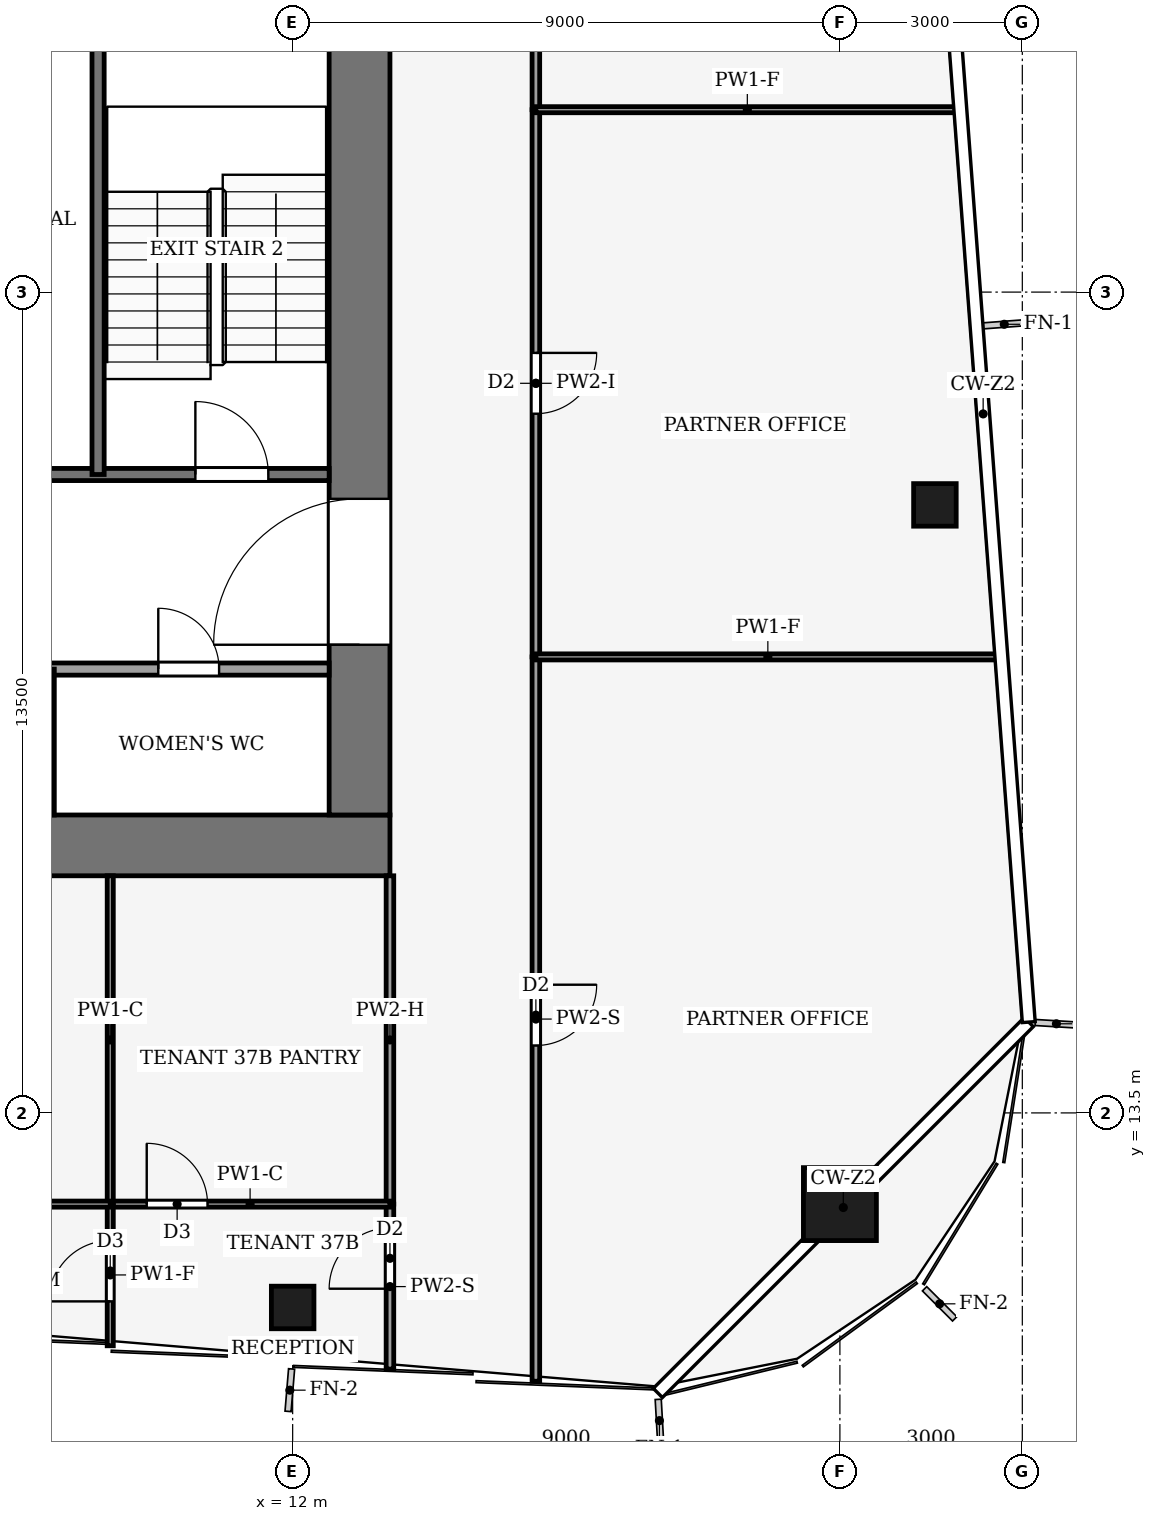
"""IFC4 building model, lengths in metres.
Left out: names, types, materials, properties, quantities, classifications, styles, units other than length and angle.
Written with IfcOpenShell. Run it as: python <this file> out.ifc"""

import sys

from ifc_helpers import new_model, si_unit, direction, frame, frame_2d, origin, origin_2d, place, context, subcontext, project, spatial, rectangle, hollow_rectangle, extrude, element, fill, save


model = new_model("IFC4")
c1 = context("Model", 3, precision=1e-05, world=origin(), true_north=direction((0.0, 1.0)))
c2 = subcontext(c1, "Body", "Model", "MODEL_VIEW")
j1 = project(units=[si_unit("LENGTHUNIT", "METRE"), si_unit("PLANEANGLEUNIT", "RADIAN")], contexts=[c1])
p1 = place(None, origin())
s1 = spatial("IfcSite", under=j1, at=p1, CompositionType="ELEMENT")
p2 = place(p1, origin())
s2 = spatial("IfcBuilding", under=s1, at=p2, CompositionType="ELEMENT")
p3 = place(p2, frame((0.0, 0.0, 162.0)))
s3 = spatial("IfcBuildingStorey", under=s2, at=p3, CompositionType="ELEMENT", Elevation=162.0)
p4 = place(p3, frame((-13.6, 17.9, -0.13), z_axis=(0.0, 0.0, 1.0), x_axis=(1.0, 0.0, 0.0)))
e1 = element("IfcWall", 1, at=p4, inside=s3, PredefinedType="SHEAR", context=c2, shape_type="SweptSolid", body=[
    extrude(rectangle(XDim=27.2, YDim=1.0, at=frame_2d((13.6, 0.0))), origin(), (0.0, 0.0, 1.0), 4.0),
])
p5 = place(p3, frame((13.1, 18.4, -0.13), z_axis=(0.0, 0.0, 1.0), x_axis=(0.0, 1.0, 0.0)))
e2 = element("IfcWall", 2, at=p5, inside=s3, PredefinedType="SHEAR", context=c2, shape_type="SweptSolid", body=[
    extrude(rectangle(XDim=19.2, YDim=1.0, at=frame_2d((9.6, 0.0))), origin(), (0.0, 0.0, 1.0), 4.0),
])
p6 = place(p5, frame((2.8, 0.0, 0.13)))
e3 = element("IfcOpeningElement", 3, at=p6, cuts=e2, PredefinedType="OPENING", context=c2, shape_type="SweptSolid", body=[
    extrude(rectangle(XDim=2.4, YDim=2.4, at=frame_2d((1.2, 1.2))), frame((0.0, 0.51, 0.0), z_axis=(0.0, -1.0, 0.0), x_axis=(1.0, 0.0, 0.0)), (0.0, 0.0, 1.0), 1.02),
])
p7 = place(p5, frame((13.3, 0.0, 0.13)))
e4 = element("IfcOpeningElement", 4, at=p7, cuts=e2, PredefinedType="OPENING", context=c2, shape_type="SweptSolid", body=[
    extrude(rectangle(XDim=2.4, YDim=2.4, at=frame_2d((1.2, 1.2))), frame((0.0, 0.51, 0.0), z_axis=(0.0, -1.0, 0.0), x_axis=(1.0, 0.0, 0.0)), (0.0, 0.0, 1.0), 1.02),
])
p8 = place(p3, frame((21.0, 12.0, 0.0), z_axis=(0.0, 0.0, 1.0), x_axis=(1.0, 0.0, 0.0)))
e5 = element("IfcColumn", 5, at=p8, inside=s3, PredefinedType="COLUMN", context=c2, shape_type="SweptSolid", body=[
    extrude(hollow_rectangle(XDim=1.2, YDim=1.2, WallThickness=0.07, at=origin_2d()), origin(), (0.0, 0.0, 1.0), 4.0),
])
for number, where, z_axis, x_axis in (
    (6, (12.0, 10.3, 0.0), (0.0, 0.0, 1.0), (1.0, 0.0, 0.0)),
    (7, (22.562, 23.5, 0.0), (0.0, 0.0, 1.0), (1.0, 0.0, 0.0)),
):
    element("IfcColumn", number, at=place(p3, frame(where, z_axis=z_axis, x_axis=x_axis)), inside=s3, PredefinedType="COLUMN", context=c2, shape_type="SweptSolid", body=[
        extrude(hollow_rectangle(XDim=0.7, YDim=0.7, WallThickness=0.03, at=origin_2d()), origin(), (0.0, 0.0, 1.0), 4.0),
    ])
p9 = place(p3, frame((6.0, 20.8, 0.0), z_axis=(0.0, 0.0, 1.0), x_axis=(1.0, 0.0, 0.0)))
e8 = element("IfcWall", 8, at=p9, inside=s3, PredefinedType="PARTITIONING", context=c2, shape_type="SweptSolid", body=[
    extrude(rectangle(XDim=6.6, YDim=0.2, at=frame_2d((3.3, 0.0))), origin(), (0.0, 0.0, 1.0), 3.87),
])
p10 = place(p9, frame((0.49, 0.0, 0.0)))
e9 = element("IfcOpeningElement", 9, at=p10, cuts=e8, PredefinedType="OPENING", context=c2, shape_type="SweptSolid", body=[
    extrude(rectangle(XDim=1.0, YDim=2.1, at=frame_2d((0.5, 1.05))), frame((0.0, 0.11, 0.0), z_axis=(0.0, -1.0, 0.0), x_axis=(1.0, 0.0, 0.0)), (0.0, 0.0, 1.0), 0.22),
])
p11 = place(p9, frame((3.79, 0.0, 0.0)))
e10 = element("IfcOpeningElement", 10, at=p11, cuts=e8, PredefinedType="OPENING", context=c2, shape_type="SweptSolid", body=[
    extrude(rectangle(XDim=1.0, YDim=2.1, at=frame_2d((0.5, 1.05))), frame((0.0, 0.11, 0.0), z_axis=(0.0, -1.0, 0.0), x_axis=(1.0, 0.0, 0.0)), (0.0, 0.0, 1.0), 0.22),
])
p12 = place(p3, frame((6.0, 24.0, 0.0), z_axis=(0.0, 0.0, 1.0), x_axis=(1.0, 0.0, 0.0)))
e11 = element("IfcWall", 11, at=p12, inside=s3, PredefinedType="PARTITIONING", context=c2, shape_type="SweptSolid", body=[
    extrude(rectangle(XDim=6.6, YDim=0.2, at=frame_2d((3.3, 0.0))), origin(), (0.0, 0.0, 1.0), 3.87),
])
p13 = place(p12, frame((0.9, 0.0, 0.0)))
e12 = element("IfcOpeningElement", 12, at=p13, cuts=e11, PredefinedType="OPENING", context=c2, shape_type="SweptSolid", body=[
    extrude(rectangle(XDim=1.0, YDim=2.1, at=frame_2d((0.5, 1.05))), frame((0.0, 0.11, 0.0), z_axis=(0.0, -1.0, 0.0), x_axis=(1.0, 0.0, 0.0)), (0.0, 0.0, 1.0), 0.22),
])
p14 = place(p12, frame((4.4, 0.0, 0.0)))
e13 = element("IfcOpeningElement", 13, at=p14, cuts=e11, PredefinedType="OPENING", context=c2, shape_type="SweptSolid", body=[
    extrude(rectangle(XDim=1.2, YDim=2.2, at=frame_2d((0.6, 1.1))), frame((0.0, 0.11, 0.0), z_axis=(0.0, -1.0, 0.0), x_axis=(1.0, 0.0, 0.0)), (0.0, 0.0, 1.0), 0.22),
])
p15 = place(p3, frame((7.98, 18.4, 0.0), z_axis=(0.0, 0.0, 1.0), x_axis=(0.0, 1.0, 0.0)))
e14 = element("IfcWall", 14, at=p15, inside=s3, PredefinedType="PARTITIONING", context=c2, shape_type="SweptSolid", body=[
    extrude(rectangle(XDim=2.4, YDim=0.2, at=frame_2d((1.2, 0.0))), origin(), (0.0, 0.0, 1.0), 3.87),
])
p16 = place(p3, frame((8.8, 24.0, 0.0), z_axis=(0.0, 0.0, 1.0), x_axis=(0.0, 1.0, 0.0)))
e15 = element("IfcWall", 15, at=p16, inside=s3, PredefinedType="PARTITIONING", context=c2, shape_type="SweptSolid", body=[
    extrude(rectangle(XDim=7.4, YDim=0.2, at=frame_2d((3.7, 0.0))), origin(), (0.0, 0.0, 1.0), 3.87),
])
p17 = place(p3, frame((16.0, 21.0, 0.0), z_axis=(0.0, 0.0, 1.0), x_axis=(0.0, -1.0, 0.0)))
e16 = element("IfcWall", 16, at=p17, inside=s3, PredefinedType="PARTITIONING", context=c2, shape_type="SweptSolid", body=[
    extrude(rectangle(XDim=11.913, YDim=0.125, at=frame_2d((5.957, 0.0))), origin(), (0.0, 0.0, 1.0), 3.04),
])
p18 = place(p17, frame((5.392, 0.0, 0.0)))
e17 = element("IfcOpeningElement", 17, at=p18, cuts=e16, PredefinedType="OPENING", context=c2, shape_type="SweptSolid", body=[
    extrude(rectangle(XDim=1.0, YDim=2.1, at=frame_2d((0.5, 1.05))), frame((0.0, 0.073, 0.0), z_axis=(0.0, -1.0, 0.0), x_axis=(1.0, 0.0, 0.0)), (0.0, 0.0, 1.0), 0.145),
])
p19 = place(p3, frame((16.0, 30.0, 0.0), z_axis=(0.0, 0.0, 1.0), x_axis=(0.0, -1.0, 0.0)))
e18 = element("IfcWall", 18, at=p19, inside=s3, PredefinedType="PARTITIONING", context=c2, shape_type="SweptSolid", body=[
    extrude(rectangle(XDim=9.0, YDim=0.125, at=frame_2d((4.5, 0.0))), origin(), (0.0, 0.0, 1.0), 3.48),
])
p20 = place(p19, frame((4.0, 0.0, 0.0)))
e19 = element("IfcOpeningElement", 19, at=p20, cuts=e18, PredefinedType="OPENING", context=c2, shape_type="SweptSolid", body=[
    extrude(rectangle(XDim=1.0, YDim=2.1, at=frame_2d((0.5, 1.05))), frame((0.0, 0.073, 0.0), z_axis=(0.0, -1.0, 0.0), x_axis=(1.0, 0.0, 0.0)), (0.0, 0.0, 1.0), 0.145),
])
p21 = place(p3, frame((16.0, 41.004, 0.0), z_axis=(0.0, 0.0, 1.0), x_axis=(0.0, -1.0, 0.0)))
e20 = element("IfcWall", 20, at=p21, inside=s3, PredefinedType="PARTITIONING", context=c2, shape_type="SweptSolid", body=[
    extrude(rectangle(XDim=11.004, YDim=0.125, at=frame_2d((5.502, 0.0))), origin(), (0.0, 0.0, 1.0), 3.14),
])
p22 = place(p21, frame((5.002, 0.0, 0.0)))
e21 = element("IfcOpeningElement", 21, at=p22, cuts=e20, PredefinedType="OPENING", context=c2, shape_type="SweptSolid", body=[
    extrude(rectangle(XDim=1.0, YDim=2.1, at=frame_2d((0.5, 1.05))), frame((0.0, 0.073, 0.0), z_axis=(0.0, -1.0, 0.0), x_axis=(1.0, 0.0, 0.0)), (0.0, 0.0, 1.0), 0.145),
])
p23 = place(p3, frame((13.6, 9.287, 0.0), z_axis=(0.0, 0.0, 1.0), x_axis=(0.0, 1.0, 0.0)))
e22 = element("IfcWall", 22, at=p23, inside=s3, PredefinedType="PARTITIONING", context=c2, shape_type="SweptSolid", body=[
    extrude(rectangle(XDim=2.713, YDim=0.125, at=frame_2d((1.357, 0.0))), origin(), (0.0, 0.0, 1.0), 3.04),
])
p24 = place(p23, frame((1.322, 0.0, 0.0)))
e23 = element("IfcOpeningElement", 23, at=p24, cuts=e22, PredefinedType="OPENING", context=c2, shape_type="SweptSolid", body=[
    extrude(rectangle(XDim=1.0, YDim=2.1, at=frame_2d((0.5, 1.05))), frame((0.0, 0.073, 0.0), z_axis=(0.0, -1.0, 0.0), x_axis=(1.0, 0.0, 0.0)), (0.0, 0.0, 1.0), 0.145),
])
p25 = place(p3, frame((13.6, 12.0, 0.0), z_axis=(0.0, 0.0, 1.0), x_axis=(0.0, 1.0, 0.0)))
e24 = element("IfcWall", 24, at=p25, inside=s3, PredefinedType="PARTITIONING", context=c2, shape_type="SweptSolid", body=[
    extrude(rectangle(XDim=5.4, YDim=0.125, at=frame_2d((2.7, 0.0))), origin(), (0.0, 0.0, 1.0), 3.14),
])
p26 = place(p3, frame((23.63, 21.0, 0.0), z_axis=(0.0, 0.0, 1.0), x_axis=(-1.0, 0.0, 0.0)))
e25 = element("IfcWall", 25, at=p26, inside=s3, PredefinedType="PARTITIONING", context=c2, shape_type="SweptSolid", body=[
    extrude(rectangle(XDim=7.63, YDim=0.1, at=frame_2d((3.815, 0.0))), origin(), (0.0, 0.0, 1.0), 3.04),
])
p27 = place(p3, frame((22.955, 30.0, 0.0), z_axis=(0.0, 0.0, 1.0), x_axis=(-1.0, 0.0, 0.0)))
e26 = element("IfcWall", 26, at=p27, inside=s3, PredefinedType="PARTITIONING", context=c2, shape_type="SweptSolid", body=[
    extrude(rectangle(XDim=6.955, YDim=0.1, at=frame_2d((3.478, 0.0))), origin(), (0.0, 0.0, 1.0), 3.04),
])
p28 = place(p3, frame((9.0, 12.0, 0.0), z_axis=(0.0, 0.0, 1.0), x_axis=(1.0, 0.0, 0.0)))
e27 = element("IfcWall", 27, at=p28, inside=s3, PredefinedType="PARTITIONING", context=c2, shape_type="SweptSolid", body=[
    extrude(rectangle(XDim=4.6, YDim=0.1, at=frame_2d((2.3, 0.0))), origin(), (0.0, 0.0, 1.0), 3.87),
])
p29 = place(p28, frame((0.6, 0.0, 0.0)))
e28 = element("IfcOpeningElement", 28, at=p29, cuts=e27, PredefinedType="OPENING", context=c2, shape_type="SweptSolid", body=[
    extrude(rectangle(XDim=1.0, YDim=2.1, at=frame_2d((0.5, 1.05))), frame((0.0, 0.06, 0.0), z_axis=(0.0, -1.0, 0.0), x_axis=(1.0, 0.0, 0.0)), (0.0, 0.0, 1.0), 0.12),
])
p30 = place(p3, frame((9.0, 9.67, 0.0), z_axis=(0.0, 0.0, 1.0), x_axis=(0.0, 1.0, 0.0)))
e29 = element("IfcWall", 29, at=p30, inside=s3, PredefinedType="PARTITIONING", context=c2, shape_type="SweptSolid", body=[
    extrude(rectangle(XDim=2.33, YDim=0.1, at=frame_2d((1.165, 0.0))), origin(), (0.0, 0.0, 1.0), 3.04),
])
p31 = place(p30, frame((0.73, 0.0, 0.0)))
e30 = element("IfcOpeningElement", 30, at=p31, cuts=e29, PredefinedType="OPENING", context=c2, shape_type="SweptSolid", body=[
    extrude(rectangle(XDim=1.0, YDim=2.1, at=frame_2d((0.5, 1.05))), frame((0.0, 0.06, 0.0), z_axis=(0.0, -1.0, 0.0), x_axis=(1.0, 0.0, 0.0)), (0.0, 0.0, 1.0), 0.12),
])
p32 = place(p3, frame((9.0, 17.4, 0.0), z_axis=(0.0, 0.0, 1.0), x_axis=(0.0, -1.0, 0.0)))
e31 = element("IfcWall", 31, at=p32, inside=s3, PredefinedType="PARTITIONING", context=c2, shape_type="SweptSolid", body=[
    extrude(rectangle(XDim=5.4, YDim=0.1, at=frame_2d((2.7, 0.0))), origin(), (0.0, 0.0, 1.0), 3.87),
])
p33 = place(p3, frame((0.0, 12.0, 0.0), z_axis=(0.0, 0.0, 1.0), x_axis=(1.0, 0.0, 0.0)))
e32 = element("IfcWall", 32, at=p33, inside=s3, PredefinedType="PARTITIONING", context=c2, shape_type="SweptSolid", body=[
    extrude(rectangle(XDim=9.0, YDim=0.1, at=frame_2d((4.5, 0.0))), origin(), (0.0, 0.0, 1.0), 3.54),
])
p34 = place(p33, frame((4.0, 0.0, 0.0)))
e33 = element("IfcOpeningElement", 33, at=p34, cuts=e32, PredefinedType="OPENING", context=c2, shape_type="SweptSolid", body=[
    extrude(rectangle(XDim=1.0, YDim=2.1, at=frame_2d((0.5, 1.05))), frame((0.0, 0.06, 0.0), z_axis=(0.0, -1.0, 0.0), x_axis=(1.0, 0.0, 0.0)), (0.0, 0.0, 1.0), 0.12),
])
p35 = place(p11, origin())
e34 = element("IfcDoor", 34, at=p35, inside=s3, OperationType="SINGLE_SWING_RIGHT", PredefinedType="DOOR", context=c2, shape_type="SweptSolid", body=[
    extrude(rectangle(XDim=1.0, YDim=2.1, at=frame_2d((0.5, 1.05))), frame((0.0, 0.025, 0.0), z_axis=(0.0, -1.0, 0.0), x_axis=(1.0, 0.0, 0.0)), (0.0, 0.0, 1.0), 0.05),
])
fill(e10, e34)
p36 = place(p14, origin())
e35 = element("IfcDoor", 35, at=p36, inside=s3, OperationType="SINGLE_SWING_LEFT", PredefinedType="DOOR", context=c2, shape_type="SweptSolid", body=[
    extrude(rectangle(XDim=1.2, YDim=2.2, at=frame_2d((0.6, 1.1))), frame((0.0, 0.025, 0.0), z_axis=(0.0, -1.0, 0.0), x_axis=(1.0, 0.0, 0.0)), (0.0, 0.0, 1.0), 0.05),
])
fill(e13, e35)
p37 = place(p6, origin())
e36 = element("IfcDoor", 36, at=p37, inside=s3, OperationType="DOUBLE_DOOR_SINGLE_SWING", PredefinedType="DOOR", context=c2, shape_type="SweptSolid", body=[
    extrude(rectangle(XDim=2.4, YDim=2.4, at=frame_2d((1.2, 1.2))), frame((0.0, 0.025, 0.0), z_axis=(0.0, -1.0, 0.0), x_axis=(1.0, 0.0, 0.0)), (0.0, 0.0, 1.0), 0.05),
])
fill(e3, e36)
p38 = place(p18, origin())
e37 = element("IfcDoor", 37, at=p38, inside=s3, OperationType="SINGLE_SWING_LEFT", PredefinedType="DOOR", context=c2, shape_type="SweptSolid", body=[
    extrude(rectangle(XDim=1.0, YDim=2.1, at=frame_2d((0.5, 1.05))), frame((0.0, 0.025, 0.0), z_axis=(0.0, -1.0, 0.0), x_axis=(1.0, 0.0, 0.0)), (0.0, 0.0, 1.0), 0.05),
])
fill(e17, e37)
p39 = place(p20, origin())
e38 = element("IfcDoor", 38, at=p39, inside=s3, OperationType="SINGLE_SWING_LEFT", PredefinedType="DOOR", context=c2, shape_type="SweptSolid", body=[
    extrude(rectangle(XDim=1.0, YDim=2.1, at=frame_2d((0.5, 1.05))), frame((0.0, 0.025, 0.0), z_axis=(0.0, -1.0, 0.0), x_axis=(1.0, 0.0, 0.0)), (0.0, 0.0, 1.0), 0.05),
])
fill(e19, e38)
p40 = place(p24, origin())
e39 = element("IfcDoor", 39, at=p40, inside=s3, OperationType="SINGLE_SWING_RIGHT", PredefinedType="DOOR", context=c2, shape_type="SweptSolid", body=[
    extrude(rectangle(XDim=1.0, YDim=2.1, at=frame_2d((0.5, 1.05))), frame((0.0, 0.025, 0.0), z_axis=(0.0, -1.0, 0.0), x_axis=(1.0, 0.0, 0.0)), (0.0, 0.0, 1.0), 0.05),
])
fill(e23, e39)
p41 = place(p29, origin())
e40 = element("IfcDoor", 40, at=p41, inside=s3, OperationType="SINGLE_SWING_LEFT", PredefinedType="DOOR", context=c2, shape_type="SweptSolid", body=[
    extrude(rectangle(XDim=1.0, YDim=2.1, at=frame_2d((0.5, 1.05))), frame((0.0, 0.025, 0.0), z_axis=(0.0, -1.0, 0.0), x_axis=(1.0, 0.0, 0.0)), (0.0, 0.0, 1.0), 0.05),
])
fill(e28, e40)
p42 = place(p31, origin())
e41 = element("IfcDoor", 41, at=p42, inside=s3, OperationType="SINGLE_SWING_RIGHT", PredefinedType="DOOR", context=c2, shape_type="SweptSolid", body=[
    extrude(rectangle(XDim=1.0, YDim=2.1, at=frame_2d((0.5, 1.05))), frame((0.0, 0.025, 0.0), z_axis=(0.0, -1.0, 0.0), x_axis=(1.0, 0.0, 0.0)), (0.0, 0.0, 1.0), 0.05),
])
fill(e30, e41)
save(model, sys.argv[1])
